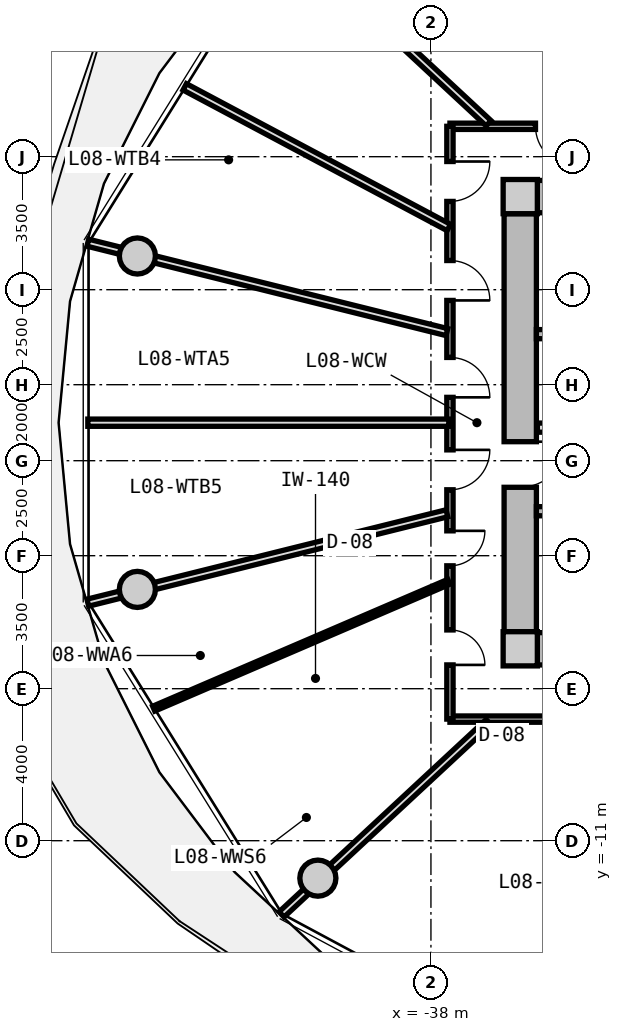
"""IFC4 building model, lengths in metres.
Left out: names, types, materials, properties, quantities, classifications, styles, units other than length and angle.
Written with IfcOpenShell. Run it as: python <this file> out.ifc"""

import sys

from ifc_helpers import new_model, si_unit, direction, frame, frame_2d, origin, origin_2d, place, context, subcontext, project, spatial, rectangle, circle, extrude, source, transform, mapped, element, fill, save


model = new_model("IFC4")
c1 = context("Model", 3, precision=1e-05, world=origin(), true_north=direction((0.0, 1.0)))
c2 = subcontext(c1, "Body", "Model", "MODEL_VIEW")
j1 = project(units=[si_unit("LENGTHUNIT", "METRE"), si_unit("PLANEANGLEUNIT", "RADIAN")], contexts=[c1])
p1 = place(None, origin())
s1 = spatial("IfcSite", under=j1, at=p1, CompositionType="ELEMENT")
p2 = place(p1, origin())
s2 = spatial("IfcBuilding", under=s1, at=p2, CompositionType="ELEMENT")
p3 = place(p2, frame((0.0, 0.0, 30.75)))
s3 = spatial("IfcBuildingStorey", under=s2, at=p3, CompositionType="ELEMENT", Elevation=30.75)
m1 = source(origin(), c2, "Body", "SweptSolid", [
    extrude(rectangle(XDim=0.9, YDim=0.9, at=origin_2d()), origin(), (0.0, 0.0, 1.0), 3.05),
])
for number, where, z_axis, x_axis in (
    (1, (-35.65, -5.95, 0.0), (0.0, 0.0, 1.0), (1.0, 0.0, 0.0)),
    (2, (-35.65, 5.95, 0.0), (0.0, 0.0, 1.0), (1.0, 0.0, 0.0)),
):
    element("IfcColumn", number, at=place(p3, frame(where, z_axis=z_axis, x_axis=x_axis)), inside=s3, PredefinedType="COLUMN", context=c2, shape_type="MappedRepresentation", body=[
        mapped(m1, transform((0.0, 0.0, 0.0), x_axis=(1.0, 0.0, 0.0), y_axis=(0.0, 1.0, 0.0), z_axis=(0.0, 0.0, 1.0), scale=1.0)),
    ])
m2 = source(origin(), c2, "Body", "SweptSolid", [
    extrude(rectangle(XDim=14.4, YDim=0.85, at=frame_2d((7.2, 0.0))), origin(), (0.0, 0.0, 1.0), 2.79),
])
for number, where, z_axis, x_axis in (
    (3, (-35.2, 5.95, 0.0), (0.0, 0.0, 1.0), (1.0, 0.0, 0.0)),
    (4, (-20.8, -5.95, 0.0), (0.0, 0.0, 1.0), (-1.0, 0.0, 0.0)),
):
    element("IfcWall", number, at=place(p3, frame(where, z_axis=z_axis, x_axis=x_axis)), inside=s3, PredefinedType="SHEAR", context=c2, shape_type="MappedRepresentation", body=[
        mapped(m2, transform((0.0, 0.0, 0.0), x_axis=(1.0, 0.0, 0.0), y_axis=(0.0, 1.0, 0.0), z_axis=(0.0, 0.0, 1.0), scale=1.0)),
    ])
m3 = source(origin(), c2, "Body", "SweptSolid", [
    extrude(rectangle(XDim=11.0, YDim=0.85, at=frame_2d((5.5, 0.0))), origin(), (0.0, 0.0, 1.0), 2.79),
])
p4 = place(p3, frame((-35.65, -5.5, 0.0), z_axis=(0.0, 0.0, 1.0), x_axis=(0.0, 1.0, 0.0)))
e5 = element("IfcWall", 5, at=p4, inside=s3, PredefinedType="SHEAR", context=c2, shape_type="MappedRepresentation", body=[
    mapped(m3, transform((0.0, 0.0, 0.0), x_axis=(1.0, 0.0, 0.0), y_axis=(0.0, 1.0, 0.0), z_axis=(0.0, 0.0, 1.0), scale=1.0)),
])
p5 = place(p4, frame((3.8, 0.0, 0.0)))
e6 = element("IfcOpeningElement", 6, at=p5, cuts=e5, PredefinedType="OPENING", context=c2, shape_type="SweptSolid", body=[
    extrude(rectangle(XDim=1.2, YDim=2.15, at=frame_2d((0.6, 1.075))), frame((0.0, 0.435, 0.0), z_axis=(0.0, -1.0, 0.0), x_axis=(1.0, 0.0, 0.0)), (0.0, 0.0, 1.0), 0.87),
])
m4 = source(origin(), c2, "Body", "SweptSolid", [
    extrude(circle(Radius=0.475, at=origin_2d()), origin(), (0.0, 0.0, 1.0), 3.05),
])
for number, where, z_axis, x_axis in (
    (7, (-45.725, 4.387, 0.0), (0.0, 0.0, 1.0), (1.0, 0.0, 0.0)),
    (8, (-45.725, -4.387, 0.0), (0.0, 0.0, 1.0), (1.0, 0.0, 0.0)),
    (9, (-40.975, -11.985, 0.0), (0.0, 0.0, 1.0), (1.0, 0.0, 0.0)),
):
    element("IfcColumn", number, at=place(p3, frame(where, z_axis=z_axis, x_axis=x_axis)), inside=s3, PredefinedType="COLUMN", context=c2, shape_type="MappedRepresentation", body=[
        mapped(m4, transform((0.0, 0.0, 0.0), x_axis=(1.0, 0.0, 0.0), y_axis=(0.0, 1.0, 0.0), z_axis=(0.0, 0.0, 1.0), scale=1.0)),
    ])
m5 = source(origin(), c2, "Body", "SweptSolid", [
    extrude(rectangle(XDim=7.765, YDim=0.24, at=frame_2d((3.883, 0.0))), origin(), (0.0, 0.0, 1.0), 2.79),
])
p6 = place(p3, frame((-35.225, 2.33, 0.0), z_axis=(0.0, 0.0, 1.0), x_axis=(1.0, 0.0, 0.0)))
e10 = element("IfcWall", 10, at=p6, inside=s3, PredefinedType="PARTITIONING", context=c2, shape_type="MappedRepresentation", body=[
    mapped(m5, transform((0.0, 0.0, 0.0), x_axis=(1.0, 0.0, 0.0), y_axis=(0.0, 1.0, 0.0), z_axis=(0.0, 0.0, 1.0), scale=1.0)),
])
p7 = place(p3, frame((-35.225, -2.33, 0.0), z_axis=(0.0, 0.0, 1.0), x_axis=(1.0, 0.0, 0.0)))
e11 = element("IfcWall", 11, at=p7, inside=s3, PredefinedType="PARTITIONING", context=c2, shape_type="MappedRepresentation", body=[
    mapped(m5, transform((0.0, 0.0, 0.0), x_axis=(1.0, 0.0, 0.0), y_axis=(0.0, 1.0, 0.0), z_axis=(0.0, 0.0, 1.0), scale=1.0)),
])
p8 = place(p7, frame((0.885, 0.0, 0.0)))
e12 = element("IfcOpeningElement", 12, at=p8, cuts=e11, PredefinedType="OPENING", context=c2, shape_type="SweptSolid", body=[
    extrude(rectangle(XDim=1.1, YDim=2.15, at=frame_2d((0.55, 1.075))), frame((0.0, 0.13, 0.0), z_axis=(0.0, -1.0, 0.0), x_axis=(1.0, 0.0, 0.0)), (0.0, 0.0, 1.0), 0.26),
])
m6 = source(origin(), c2, "Body", "SweptSolid", [
    extrude(rectangle(XDim=7.62, YDim=0.24, at=frame_2d((3.81, 0.0))), origin(), (0.0, 0.0, 1.0), 2.775),
])
p9 = place(p3, frame((-35.2, -0.13, 0.0), z_axis=(0.0, 0.0, 1.0), x_axis=(1.0, 0.0, 0.0)))
e13 = element("IfcWall", 13, at=p9, inside=s3, PredefinedType="PARTITIONING", context=c2, shape_type="MappedRepresentation", body=[
    mapped(m6, transform((0.0, 0.0, 0.0), x_axis=(1.0, 0.0, 0.0), y_axis=(0.0, 1.0, 0.0), z_axis=(0.0, 0.0, 1.0), scale=1.0)),
])
p10 = place(p9, frame((6.22, 0.0, 0.0)))
e14 = element("IfcOpeningElement", 14, at=p10, cuts=e13, PredefinedType="OPENING", context=c2, shape_type="SweptSolid", body=[
    extrude(rectangle(XDim=1.0, YDim=2.1, at=frame_2d((0.5, 1.05))), frame((0.0, 0.13, 0.0), z_axis=(0.0, -1.0, 0.0), x_axis=(1.0, 0.0, 0.0)), (0.0, 0.0, 1.0), 0.26),
])
p11 = place(p9, frame((0.85, 0.0, 0.0)))
e15 = element("IfcOpeningElement", 15, at=p11, cuts=e13, PredefinedType="OPENING", context=c2, shape_type="SweptSolid", body=[
    extrude(rectangle(XDim=1.1, YDim=2.2, at=frame_2d((0.55, 1.1))), frame((0.0, 0.13, 0.0), z_axis=(0.0, -1.0, 0.0), x_axis=(1.0, 0.0, 0.0)), (0.0, 0.0, 1.0), 0.26),
])
p12 = place(p9, frame((3.85, 0.0, 0.0)))
e16 = element("IfcOpeningElement", 16, at=p12, cuts=e13, PredefinedType="OPENING", context=c2, shape_type="SweptSolid", body=[
    extrude(rectangle(XDim=1.1, YDim=2.2, at=frame_2d((0.55, 1.1))), frame((0.0, 0.13, 0.0), z_axis=(0.0, -1.0, 0.0), x_axis=(1.0, 0.0, 0.0)), (0.0, 0.0, 1.0), 0.26),
])
m7 = source(origin(), c2, "Body", "SweptSolid", [
    extrude(rectangle(XDim=19.0, YDim=0.165, at=frame_2d((9.5, 0.0))), origin(), (0.0, 0.0, 1.0), 2.775),
])
p13 = place(p3, frame((-37.5, 7.8, 0.0), z_axis=(0.0, 0.0, 1.0), x_axis=(1.0, 0.0, 0.0)))
e17 = element("IfcWall", 17, at=p13, inside=s3, PredefinedType="PARTITIONING", context=c2, shape_type="MappedRepresentation", body=[
    mapped(m7, transform((0.0, 0.0, 0.0), x_axis=(1.0, 0.0, 0.0), y_axis=(0.0, 1.0, 0.0), z_axis=(0.0, 0.0, 1.0), scale=1.0)),
])
p14 = place(p13, frame((9.352, 0.0, 0.0)))
e18 = element("IfcOpeningElement", 18, at=p14, cuts=e17, PredefinedType="OPENING", context=c2, shape_type="SweptSolid", body=[
    extrude(rectangle(XDim=1.05, YDim=2.15, at=frame_2d((0.525, 1.075))), frame((0.0, 0.093, 0.0), z_axis=(0.0, -1.0, 0.0), x_axis=(1.0, 0.0, 0.0)), (0.0, 0.0, 1.0), 0.185),
])
p15 = place(p13, frame((7.806, 0.0, 0.0)))
e19 = element("IfcOpeningElement", 19, at=p15, cuts=e17, PredefinedType="OPENING", context=c2, shape_type="SweptSolid", body=[
    extrude(rectangle(XDim=1.05, YDim=2.15, at=frame_2d((0.525, 1.075))), frame((0.0, 0.093, 0.0), z_axis=(0.0, -1.0, 0.0), x_axis=(1.0, 0.0, 0.0)), (0.0, 0.0, 1.0), 0.185),
])
p16 = place(p13, frame((4.773, 0.0, 0.0)))
e20 = element("IfcOpeningElement", 20, at=p16, cuts=e17, PredefinedType="OPENING", context=c2, shape_type="SweptSolid", body=[
    extrude(rectangle(XDim=1.05, YDim=2.15, at=frame_2d((0.525, 1.075))), frame((0.0, 0.093, 0.0), z_axis=(0.0, -1.0, 0.0), x_axis=(1.0, 0.0, 0.0)), (0.0, 0.0, 1.0), 0.185),
])
p17 = place(p13, frame((2.251, 0.0, 0.0)))
e21 = element("IfcOpeningElement", 21, at=p17, cuts=e17, PredefinedType="OPENING", context=c2, shape_type="SweptSolid", body=[
    extrude(rectangle(XDim=1.05, YDim=2.15, at=frame_2d((0.525, 1.075))), frame((0.0, 0.093, 0.0), z_axis=(0.0, -1.0, 0.0), x_axis=(1.0, 0.0, 0.0)), (0.0, 0.0, 1.0), 0.185),
])
p18 = place(p13, frame((14.653, 0.0, 0.0)))
e22 = element("IfcOpeningElement", 22, at=p18, cuts=e17, PredefinedType="OPENING", context=c2, shape_type="SweptSolid", body=[
    extrude(rectangle(XDim=1.05, YDim=2.15, at=frame_2d((0.525, 1.075))), frame((0.0, 0.093, 0.0), z_axis=(0.0, -1.0, 0.0), x_axis=(1.0, 0.0, 0.0)), (0.0, 0.0, 1.0), 0.185),
])
p19 = place(p13, frame((12.5, 0.0, 0.0)))
e23 = element("IfcOpeningElement", 23, at=p19, cuts=e17, PredefinedType="OPENING", context=c2, shape_type="SweptSolid", body=[
    extrude(rectangle(XDim=1.05, YDim=2.15, at=frame_2d((0.525, 1.075))), frame((0.0, 0.093, 0.0), z_axis=(0.0, -1.0, 0.0), x_axis=(1.0, 0.0, 0.0)), (0.0, 0.0, 1.0), 0.185),
])
p20 = place(p3, frame((-18.5, -7.8, 0.0), z_axis=(0.0, 0.0, 1.0), x_axis=(-1.0, 0.0, 0.0)))
e24 = element("IfcWall", 24, at=p20, inside=s3, PredefinedType="PARTITIONING", context=c2, shape_type="MappedRepresentation", body=[
    mapped(m7, transform((0.0, 0.0, 0.0), x_axis=(1.0, 0.0, 0.0), y_axis=(0.0, 1.0, 0.0), z_axis=(0.0, 0.0, 1.0), scale=1.0)),
])
p21 = place(p20, frame((14.244, 0.0, 0.0)))
e25 = element("IfcOpeningElement", 25, at=p21, cuts=e24, PredefinedType="OPENING", context=c2, shape_type="SweptSolid", body=[
    extrude(rectangle(XDim=1.25, YDim=2.2, at=frame_2d((0.625, 1.1))), frame((0.0, 0.093, 0.0), z_axis=(0.0, -1.0, 0.0), x_axis=(1.0, 0.0, 0.0)), (0.0, 0.0, 1.0), 0.185),
])
p22 = place(p20, frame((8.875, 0.0, 0.0)))
e26 = element("IfcOpeningElement", 26, at=p22, cuts=e24, PredefinedType="OPENING", context=c2, shape_type="SweptSolid", body=[
    extrude(rectangle(XDim=1.25, YDim=2.2, at=frame_2d((0.625, 1.1))), frame((0.0, 0.093, 0.0), z_axis=(0.0, -1.0, 0.0), x_axis=(1.0, 0.0, 0.0)), (0.0, 0.0, 1.0), 0.185),
])
p23 = place(p20, frame((3.506, 0.0, 0.0)))
e27 = element("IfcOpeningElement", 27, at=p23, cuts=e24, PredefinedType="OPENING", context=c2, shape_type="SweptSolid", body=[
    extrude(rectangle(XDim=1.25, YDim=2.2, at=frame_2d((0.625, 1.1))), frame((0.0, 0.093, 0.0), z_axis=(0.0, -1.0, 0.0), x_axis=(1.0, 0.0, 0.0)), (0.0, 0.0, 1.0), 0.185),
])
m8 = source(origin(), c2, "Body", "SweptSolid", [
    extrude(rectangle(XDim=15.6, YDim=0.165, at=frame_2d((7.8, 0.0))), origin(), (0.0, 0.0, 1.0), 2.775),
])
p24 = place(p3, frame((-37.5, -7.8, 0.0), z_axis=(0.0, 0.0, 1.0), x_axis=(0.0, 1.0, 0.0)))
e28 = element("IfcWall", 28, at=p24, inside=s3, PredefinedType="PARTITIONING", context=c2, shape_type="MappedRepresentation", body=[
    mapped(m8, transform((0.0, 0.0, 0.0), x_axis=(1.0, 0.0, 0.0), y_axis=(0.0, 1.0, 0.0), z_axis=(0.0, 0.0, 1.0), scale=1.0)),
])
p25 = place(p24, frame((13.623, 0.0, 0.0)))
e29 = element("IfcOpeningElement", 29, at=p25, cuts=e28, PredefinedType="OPENING", context=c2, shape_type="SweptSolid", body=[
    extrude(rectangle(XDim=1.05, YDim=2.15, at=frame_2d((0.525, 1.075))), frame((0.0, 0.093, 0.0), z_axis=(0.0, -1.0, 0.0), x_axis=(1.0, 0.0, 0.0)), (0.0, 0.0, 1.0), 0.185),
])
p26 = place(p24, frame((11.018, 0.0, 0.0)))
e30 = element("IfcOpeningElement", 30, at=p26, cuts=e28, PredefinedType="OPENING", context=c2, shape_type="SweptSolid", body=[
    extrude(rectangle(XDim=1.05, YDim=2.15, at=frame_2d((0.525, 1.075))), frame((0.0, 0.093, 0.0), z_axis=(0.0, -1.0, 0.0), x_axis=(1.0, 0.0, 0.0)), (0.0, 0.0, 1.0), 0.185),
])
p27 = place(p24, frame((8.467, 0.0, 0.0)))
e31 = element("IfcOpeningElement", 31, at=p27, cuts=e28, PredefinedType="OPENING", context=c2, shape_type="SweptSolid", body=[
    extrude(rectangle(XDim=1.05, YDim=2.15, at=frame_2d((0.525, 1.075))), frame((0.0, 0.093, 0.0), z_axis=(0.0, -1.0, 0.0), x_axis=(1.0, 0.0, 0.0)), (0.0, 0.0, 1.0), 0.185),
])
p28 = place(p24, frame((6.035, 0.0, 0.0)))
e32 = element("IfcOpeningElement", 32, at=p28, cuts=e28, PredefinedType="OPENING", context=c2, shape_type="SweptSolid", body=[
    extrude(rectangle(XDim=1.05, YDim=2.15, at=frame_2d((0.525, 1.075))), frame((0.0, 0.093, 0.0), z_axis=(0.0, -1.0, 0.0), x_axis=(1.0, 0.0, 0.0)), (0.0, 0.0, 1.0), 0.185),
])
p29 = place(p24, frame((4.034, 0.0, 0.0)))
e33 = element("IfcOpeningElement", 33, at=p29, cuts=e28, PredefinedType="OPENING", context=c2, shape_type="SweptSolid", body=[
    extrude(rectangle(XDim=0.92, YDim=2.1, at=frame_2d((0.46, 1.05))), frame((0.0, 0.093, 0.0), z_axis=(0.0, -1.0, 0.0), x_axis=(1.0, 0.0, 0.0)), (0.0, 0.0, 1.0), 0.185),
])
p30 = place(p24, frame((1.426, 0.0, 0.0)))
e34 = element("IfcOpeningElement", 34, at=p30, cuts=e28, PredefinedType="OPENING", context=c2, shape_type="SweptSolid", body=[
    extrude(rectangle(XDim=0.92, YDim=2.1, at=frame_2d((0.46, 1.05))), frame((0.0, 0.093, 0.0), z_axis=(0.0, -1.0, 0.0), x_axis=(1.0, 0.0, 0.0)), (0.0, 0.0, 1.0), 0.185),
])
m9 = source(origin(), c2, "Body", "SweptSolid", [
    extrude(rectangle(XDim=7.435, YDim=0.19, at=frame_2d((3.717, 0.0))), origin(), (0.0, 0.0, 1.0), 2.225),
])
p31 = place(p3, frame((-36.483, 7.88, 0.0), z_axis=(0.0, 0.0, 1.0), x_axis=(-0.732651956848, 0.680603489652, 0.0)))
e35 = element("IfcWall", 35, at=p31, inside=s3, PredefinedType="PARTITIONING", context=c2, shape_type="MappedRepresentation", body=[
    mapped(m9, transform((0.0, 0.0, 0.0), x_axis=(1.0, 0.0, 0.0), y_axis=(0.0, 1.0, 0.0), z_axis=(0.0, 0.0, 1.0), scale=1.0)),
])
m10 = source(origin(), c2, "Body", "SweptSolid", [
    extrude(rectangle(XDim=8.598, YDim=0.19, at=frame_2d((4.299, 0.0))), origin(), (0.0, 0.0, 1.0), 2.775),
])
p32 = place(p3, frame((-32.957, 8.017, 0.0), z_axis=(0.0, 0.0, 1.0), x_axis=(-0.530039776395, 0.847972779893, 0.0)))
e36 = element("IfcWall", 36, at=p32, inside=s3, PredefinedType="PARTITIONING", context=c2, shape_type="MappedRepresentation", body=[
    mapped(m10, transform((0.0, 0.0, 0.0), x_axis=(1.0, 0.0, 0.0), y_axis=(0.0, 1.0, 0.0), z_axis=(0.0, 0.0, 1.0), scale=1.0)),
])
m11 = source(origin(), c2, "Body", "SweptSolid", [
    extrude(rectangle(XDim=9.737, YDim=0.19, at=frame_2d((4.869, 0.0))), origin(), (0.0, 0.0, 1.0), 2.415),
])
p33 = place(p3, frame((-37.58, 2.385, 0.0), z_axis=(0.0, 0.0, 1.0), x_axis=(-0.970392716238, 0.241532557375, 0.0)))
e37 = element("IfcWall", 37, at=p33, inside=s3, PredefinedType="PARTITIONING", context=c2, shape_type="MappedRepresentation", body=[
    mapped(m11, transform((0.0, 0.0, 0.0), x_axis=(1.0, 0.0, 0.0), y_axis=(0.0, 1.0, 0.0), z_axis=(0.0, 0.0, 1.0), scale=1.0)),
])
m12 = source(origin(), c2, "Body", "SweptSolid", [
    extrude(rectangle(XDim=7.873, YDim=0.19, at=frame_2d((3.937, 0.0))), origin(), (0.0, 0.0, 1.0), 2.775),
])
p34 = place(p3, frame((-37.53, 5.138, 0.0), z_axis=(0.0, 0.0, 1.0), x_axis=(-0.882666052726, 0.470000680175, 0.0)))
e38 = element("IfcWall", 38, at=p34, inside=s3, PredefinedType="PARTITIONING", context=c2, shape_type="MappedRepresentation", body=[
    mapped(m12, transform((0.0, 0.0, 0.0), x_axis=(1.0, 0.0, 0.0), y_axis=(0.0, 1.0, 0.0), z_axis=(0.0, 0.0, 1.0), scale=1.0)),
])
m13 = source(origin(), c2, "Body", "SweptSolid", [
    extrude(rectangle(XDim=9.737, YDim=0.19, at=frame_2d((4.869, 0.0))), origin(), (0.0, 0.0, 1.0), 2.225),
])
p35 = place(p3, frame((-37.58, -2.385, 0.0), z_axis=(0.0, 0.0, 1.0), x_axis=(-0.970392716238, -0.241532557375, 0.0)))
e39 = element("IfcWall", 39, at=p35, inside=s3, PredefinedType="PARTITIONING", context=c2, shape_type="MappedRepresentation", body=[
    mapped(m13, transform((0.0, 0.0, 0.0), x_axis=(1.0, 0.0, 0.0), y_axis=(0.0, 1.0, 0.0), z_axis=(0.0, 0.0, 1.0), scale=1.0)),
])
m14 = source(origin(), c2, "Body", "SweptSolid", [
    extrude(rectangle(XDim=9.499, YDim=0.19, at=frame_2d((4.75, 0.0))), origin(), (0.0, 0.0, 1.0), 2.775),
])
p36 = place(p3, frame((-37.53, 0.0, 0.0), z_axis=(0.0, 0.0, 1.0), x_axis=(-1.0, 0.0, 0.0)))
e40 = element("IfcWall", 40, at=p36, inside=s3, PredefinedType="PARTITIONING", context=c2, shape_type="MappedRepresentation", body=[
    mapped(m14, transform((0.0, 0.0, 0.0), x_axis=(1.0, 0.0, 0.0), y_axis=(0.0, 1.0, 0.0), z_axis=(0.0, 0.0, 1.0), scale=1.0)),
])
p37 = place(p3, frame((-36.483, -7.88, 0.0), z_axis=(0.0, 0.0, 1.0), x_axis=(-0.732651956848, -0.680603489652, 0.0)))
e41 = element("IfcWall", 41, at=p37, inside=s3, PredefinedType="PARTITIONING", context=c2, shape_type="MappedRepresentation", body=[
    mapped(m9, transform((0.0, 0.0, 0.0), x_axis=(1.0, 0.0, 0.0), y_axis=(0.0, 1.0, 0.0), z_axis=(0.0, 0.0, 1.0), scale=1.0)),
])
m15 = source(origin(), c2, "Body", "SweptSolid", [
    extrude(rectangle(XDim=8.452, YDim=0.14, at=frame_2d((4.226, 0.0))), origin(), (0.0, 0.0, 1.0), 2.775),
])
p38 = place(p3, frame((-37.53, -4.188, 0.0), z_axis=(0.0, 0.0, 1.0), x_axis=(-0.918706709896, -0.394940478036, 0.0)))
e42 = element("IfcWall", 42, at=p38, inside=s3, PredefinedType="PARTITIONING", context=c2, shape_type="MappedRepresentation", body=[
    mapped(m15, transform((0.0, 0.0, 0.0), x_axis=(1.0, 0.0, 0.0), y_axis=(0.0, 1.0, 0.0), z_axis=(0.0, 0.0, 1.0), scale=1.0)),
])
m16 = source(origin(), c2, "Body", "SweptSolid", [
    extrude(rectangle(XDim=1.2, YDim=2.15, at=frame_2d((0.6, 1.075))), frame((0.0, 0.025, 0.0), z_axis=(0.0, -1.0, 0.0), x_axis=(1.0, 0.0, 0.0)), (0.0, 0.0, 1.0), 0.05),
])
p39 = place(p5, frame((1.2, 0.0, 0.0), z_axis=(0.0, 0.0, 1.0), x_axis=(-1.0, 0.0, 0.0)))
e43 = element("IfcDoor", 43, at=p39, inside=s3, OperationType="SINGLE_SWING_LEFT", PredefinedType="DOOR", context=c2, shape_type="MappedRepresentation", body=[
    mapped(m16, transform((0.0, 0.0, 0.0), x_axis=(1.0, 0.0, 0.0), y_axis=(0.0, 1.0, 0.0), z_axis=(0.0, 0.0, 1.0), scale=1.0)),
])
fill(e6, e43)
m17 = source(origin(), c2, "Body", "SweptSolid", [
    extrude(rectangle(XDim=1.05, YDim=2.15, at=frame_2d((0.525, 1.075))), frame((0.0, 0.025, 0.0), z_axis=(0.0, -1.0, 0.0), x_axis=(1.0, 0.0, 0.0)), (0.0, 0.0, 1.0), 0.05),
])
p40 = place(p17, frame((1.05, 0.0, 0.0), z_axis=(0.0, 0.0, 1.0), x_axis=(-1.0, 0.0, 0.0)))
e44 = element("IfcDoor", 44, at=p40, inside=s3, OperationType="SINGLE_SWING_LEFT", PredefinedType="DOOR", context=c2, shape_type="MappedRepresentation", body=[
    mapped(m17, transform((0.0, 0.0, 0.0), x_axis=(1.0, 0.0, 0.0), y_axis=(0.0, 1.0, 0.0), z_axis=(0.0, 0.0, 1.0), scale=1.0)),
])
fill(e21, e44)
p41 = place(p25, frame((1.05, 0.0, 0.0), z_axis=(0.0, 0.0, 1.0), x_axis=(-1.0, 0.0, 0.0)))
e45 = element("IfcDoor", 45, at=p41, inside=s3, OperationType="SINGLE_SWING_LEFT", PredefinedType="DOOR", context=c2, shape_type="MappedRepresentation", body=[
    mapped(m17, transform((0.0, 0.0, 0.0), x_axis=(1.0, 0.0, 0.0), y_axis=(0.0, 1.0, 0.0), z_axis=(0.0, 0.0, 1.0), scale=1.0)),
])
fill(e29, e45)
p42 = place(p26, frame((1.05, 0.0, 0.0), z_axis=(0.0, 0.0, 1.0), x_axis=(-1.0, 0.0, 0.0)))
e46 = element("IfcDoor", 46, at=p42, inside=s3, OperationType="SINGLE_SWING_RIGHT", PredefinedType="DOOR", context=c2, shape_type="MappedRepresentation", body=[
    mapped(m17, transform((0.0, 0.0, 0.0), x_axis=(1.0, 0.0, 0.0), y_axis=(0.0, 1.0, 0.0), z_axis=(0.0, 0.0, 1.0), scale=1.0)),
])
fill(e30, e46)
p43 = place(p27, frame((1.05, 0.0, 0.0), z_axis=(0.0, 0.0, 1.0), x_axis=(-1.0, 0.0, 0.0)))
e47 = element("IfcDoor", 47, at=p43, inside=s3, OperationType="SINGLE_SWING_RIGHT", PredefinedType="DOOR", context=c2, shape_type="MappedRepresentation", body=[
    mapped(m17, transform((0.0, 0.0, 0.0), x_axis=(1.0, 0.0, 0.0), y_axis=(0.0, 1.0, 0.0), z_axis=(0.0, 0.0, 1.0), scale=1.0)),
])
fill(e31, e47)
p44 = place(p28, frame((1.05, 0.0, 0.0), z_axis=(0.0, 0.0, 1.0), x_axis=(-1.0, 0.0, 0.0)))
e48 = element("IfcDoor", 48, at=p44, inside=s3, OperationType="SINGLE_SWING_LEFT", PredefinedType="DOOR", context=c2, shape_type="MappedRepresentation", body=[
    mapped(m17, transform((0.0, 0.0, 0.0), x_axis=(1.0, 0.0, 0.0), y_axis=(0.0, 1.0, 0.0), z_axis=(0.0, 0.0, 1.0), scale=1.0)),
])
fill(e32, e48)
m18 = source(origin(), c2, "Body", "SweptSolid", [
    extrude(rectangle(XDim=0.92, YDim=2.1, at=frame_2d((0.46, 1.05))), frame((0.0, 0.025, 0.0), z_axis=(0.0, -1.0, 0.0), x_axis=(1.0, 0.0, 0.0)), (0.0, 0.0, 1.0), 0.05),
])
p45 = place(p29, frame((0.92, 0.0, 0.0), z_axis=(0.0, 0.0, 1.0), x_axis=(-1.0, 0.0, 0.0)))
e49 = element("IfcDoor", 49, at=p45, inside=s3, OperationType="SINGLE_SWING_LEFT", PredefinedType="DOOR", context=c2, shape_type="MappedRepresentation", body=[
    mapped(m18, transform((0.0, 0.0, 0.0), x_axis=(1.0, 0.0, 0.0), y_axis=(0.0, 1.0, 0.0), z_axis=(0.0, 0.0, 1.0), scale=1.0)),
])
fill(e33, e49)
p46 = place(p30, frame((0.92, 0.0, 0.0), z_axis=(0.0, 0.0, 1.0), x_axis=(-1.0, 0.0, 0.0)))
e50 = element("IfcDoor", 50, at=p46, inside=s3, OperationType="SINGLE_SWING_RIGHT", PredefinedType="DOOR", context=c2, shape_type="MappedRepresentation", body=[
    mapped(m18, transform((0.0, 0.0, 0.0), x_axis=(1.0, 0.0, 0.0), y_axis=(0.0, 1.0, 0.0), z_axis=(0.0, 0.0, 1.0), scale=1.0)),
])
fill(e34, e50)
save(model, sys.argv[1])
